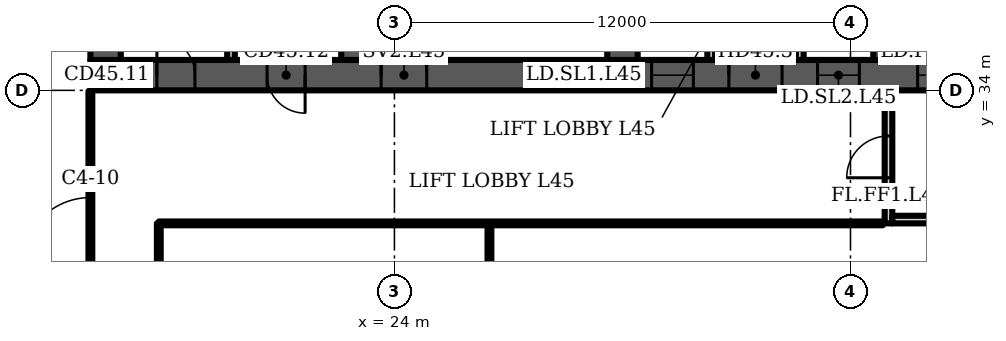
"""IFC4 building model, lengths in metres.
Left out: names, types, materials, properties, quantities, classifications, styles, units other than length and angle.
Written with IfcOpenShell. Run it as: python <this file> out.ifc"""

import sys

from ifc_helpers import new_model, si_unit, direction, frame, frame_2d, origin, place, context, subcontext, project, spatial, polyline, rectangle, outline, extrude, element, fill, save


model = new_model("IFC4")
c1 = context("Model", 3, precision=1e-05, world=origin(), true_north=direction((0.0, 1.0)))
c2 = subcontext(c1, "Body", "Model", "MODEL_VIEW")
j1 = project(units=[si_unit("LENGTHUNIT", "METRE"), si_unit("PLANEANGLEUNIT", "RADIAN")], contexts=[c1])
p1 = place(None, origin())
s1 = spatial("IfcSite", under=j1, at=p1, CompositionType="ELEMENT")
p2 = place(p1, origin())
s2 = spatial("IfcBuilding", under=s1, at=p2, CompositionType="ELEMENT")
p3 = place(p2, frame((0.0, 0.0, 184.3)))
s3 = spatial("IfcBuildingStorey", under=s2, at=p3, CompositionType="ELEMENT", Elevation=184.3)
p4 = place(p3, frame((16.0, 34.4, 0.0), z_axis=(0.0, 0.0, 1.0), x_axis=(1.0, 0.0, 0.0)))
e1 = element("IfcWall", 1, at=p4, inside=s3, PredefinedType="SHEAR", context=c2, shape_type="SweptSolid", body=[
    extrude(rectangle(XDim=42.0, YDim=0.8, at=frame_2d((21.0, 0.0))), origin(), (0.0, 0.0, 1.0), 3.6),
])
p5 = place(p4, frame((1.75, 0.0, 0.0)))
e2 = element("IfcOpeningElement", 2, at=p5, cuts=e1, PredefinedType="OPENING", context=c2, shape_type="SweptSolid", body=[
    extrude(rectangle(XDim=1.0, YDim=2.1, at=frame_2d((0.5, 1.05))), frame((0.0, 0.41, 0.0), z_axis=(0.0, -1.0, 0.0), x_axis=(1.0, 0.0, 0.0)), (0.0, 0.0, 1.0), 0.82),
])
p6 = place(p4, frame((4.65, 0.0, 0.0)))
e3 = element("IfcOpeningElement", 3, at=p6, cuts=e1, PredefinedType="OPENING", context=c2, shape_type="SweptSolid", body=[
    extrude(rectangle(XDim=1.0, YDim=2.1, at=frame_2d((0.5, 1.05))), frame((0.0, 0.41, 0.0), z_axis=(0.0, -1.0, 0.0), x_axis=(1.0, 0.0, 0.0)), (0.0, 0.0, 1.0), 0.82),
])
p7 = place(p4, frame((7.65, 0.0, 0.0)))
e4 = element("IfcOpeningElement", 4, at=p7, cuts=e1, PredefinedType="OPENING", context=c2, shape_type="SweptSolid", body=[
    extrude(rectangle(XDim=1.2, YDim=2.1, at=frame_2d((0.6, 1.05))), frame((0.0, 0.41, 0.0), z_axis=(0.0, -1.0, 0.0), x_axis=(1.0, 0.0, 0.0)), (0.0, 0.0, 1.0), 0.82),
])
p8 = place(p4, frame((14.767, 0.0, 0.0)))
e5 = element("IfcOpeningElement", 5, at=p8, cuts=e1, PredefinedType="OPENING", context=c2, shape_type="SweptSolid", body=[
    extrude(rectangle(XDim=1.1, YDim=2.1, at=frame_2d((0.55, 1.05))), frame((0.0, 0.41, 0.0), z_axis=(0.0, -1.0, 0.0), x_axis=(1.0, 0.0, 0.0)), (0.0, 0.0, 1.0), 0.82),
])
p9 = place(p4, frame((19.133, 0.0, 0.0)))
e6 = element("IfcOpeningElement", 6, at=p9, cuts=e1, PredefinedType="OPENING", context=c2, shape_type="SweptSolid", body=[
    extrude(rectangle(XDim=1.1, YDim=2.1, at=frame_2d((0.55, 1.05))), frame((0.0, 0.41, 0.0), z_axis=(0.0, -1.0, 0.0), x_axis=(1.0, 0.0, 0.0)), (0.0, 0.0, 1.0), 0.82),
])
p10 = place(p4, frame((16.8, 0.0, 0.0)))
e7 = element("IfcOpeningElement", 7, at=p10, cuts=e1, PredefinedType="OPENING", context=c2, shape_type="SweptSolid", body=[
    extrude(rectangle(XDim=1.4, YDim=2.1, at=frame_2d((0.7, 1.05))), frame((0.0, 0.41, 0.0), z_axis=(0.0, -1.0, 0.0), x_axis=(1.0, 0.0, 0.0)), (0.0, 0.0, 1.0), 0.82),
])
p11 = place(p4, frame((21.767, 0.0, 0.0)))
e8 = element("IfcOpeningElement", 8, at=p11, cuts=e1, PredefinedType="OPENING", context=c2, shape_type="SweptSolid", body=[
    extrude(rectangle(XDim=1.1, YDim=2.1, at=frame_2d((0.55, 1.05))), frame((0.0, 0.41, 0.0), z_axis=(0.0, -1.0, 0.0), x_axis=(1.0, 0.0, 0.0)), (0.0, 0.0, 1.0), 0.82),
])
p12 = place(p4, frame((23.95, 0.0, 0.0)))
e9 = element("IfcOpeningElement", 9, at=p12, cuts=e1, PredefinedType="OPENING", context=c2, shape_type="SweptSolid", body=[
    extrude(rectangle(XDim=1.1, YDim=2.1, at=frame_2d((0.55, 1.05))), frame((0.0, 0.41, 0.0), z_axis=(0.0, -1.0, 0.0), x_axis=(1.0, 0.0, 0.0)), (0.0, 0.0, 1.0), 0.82),
])
p13 = place(p4, frame((26.133, 0.0, 0.0)))
e10 = element("IfcOpeningElement", 10, at=p13, cuts=e1, PredefinedType="OPENING", context=c2, shape_type="SweptSolid", body=[
    extrude(rectangle(XDim=1.1, YDim=2.1, at=frame_2d((0.55, 1.05))), frame((0.0, 0.41, 0.0), z_axis=(0.0, -1.0, 0.0), x_axis=(1.0, 0.0, 0.0)), (0.0, 0.0, 1.0), 0.82),
])
p14 = place(p4, frame((33.15, 0.0, 0.0)))
e11 = element("IfcOpeningElement", 11, at=p14, cuts=e1, PredefinedType="OPENING", context=c2, shape_type="SweptSolid", body=[
    extrude(rectangle(XDim=1.2, YDim=2.1, at=frame_2d((0.6, 1.05))), frame((0.0, 0.41, 0.0), z_axis=(0.0, -1.0, 0.0), x_axis=(1.0, 0.0, 0.0)), (0.0, 0.0, 1.0), 0.82),
])
p15 = place(p4, frame((35.817, 0.0, 0.0)))
e12 = element("IfcOpeningElement", 12, at=p15, cuts=e1, PredefinedType="OPENING", context=c2, shape_type="SweptSolid", body=[
    extrude(rectangle(XDim=1.0, YDim=2.1, at=frame_2d((0.5, 1.05))), frame((0.0, 0.41, 0.0), z_axis=(0.0, -1.0, 0.0), x_axis=(1.0, 0.0, 0.0)), (0.0, 0.0, 1.0), 0.82),
])
p16 = place(p4, frame((39.95, 0.0, 0.0)))
e13 = element("IfcOpeningElement", 13, at=p16, cuts=e1, PredefinedType="OPENING", context=c2, shape_type="SweptSolid", body=[
    extrude(rectangle(XDim=1.0, YDim=2.1, at=frame_2d((0.5, 1.05))), frame((0.0, 0.41, 0.0), z_axis=(0.0, -1.0, 0.0), x_axis=(1.0, 0.0, 0.0)), (0.0, 0.0, 1.0), 0.82),
])
p17 = place(p4, frame((37.767, 0.0, 0.0)))
e14 = element("IfcOpeningElement", 14, at=p17, cuts=e1, PredefinedType="OPENING", context=c2, shape_type="SweptSolid", body=[
    extrude(rectangle(XDim=1.4, YDim=2.1, at=frame_2d((0.7, 1.05))), frame((0.0, 0.41, 0.0), z_axis=(0.0, -1.0, 0.0), x_axis=(1.0, 0.0, 0.0)), (0.0, 0.0, 1.0), 0.82),
])
p18 = place(p3, frame((16.4, 34.8, 0.0), z_axis=(0.0, 0.0, 1.0), x_axis=(0.0, 1.0, 0.0)))
e15 = element("IfcWall", 15, at=p18, inside=s3, PredefinedType="SHEAR", context=c2, shape_type="SweptSolid", body=[
    extrude(rectangle(XDim=13.184, YDim=0.8, at=frame_2d((6.592, 0.0))), origin(), (0.0, 0.0, 1.0), 3.6),
])
p19 = place(p3, frame((23.0, 34.8, 0.0), z_axis=(0.0, 0.0, 1.0), x_axis=(0.0, 1.0, 0.0)))
e16 = element("IfcWall", 16, at=p19, inside=s3, PredefinedType="SHEAR", context=c2, shape_type="SweptSolid", body=[
    extrude(rectangle(XDim=13.762, YDim=0.8, at=frame_2d((6.881, 0.0))), origin(), (0.0, 0.0, 1.0), 3.6),
])
p20 = place(p19, frame((10.0, 0.0, 0.0)))
e17 = element("IfcOpeningElement", 17, at=p20, cuts=e16, PredefinedType="OPENING", context=c2, shape_type="SweptSolid", body=[
    extrude(rectangle(XDim=1.0, YDim=2.1, at=frame_2d((0.5, 1.05))), frame((0.0, 0.41, 0.0), z_axis=(0.0, -1.0, 0.0), x_axis=(1.0, 0.0, 0.0)), (0.0, 0.0, 1.0), 0.82),
])
p21 = place(p3, frame((30.0, 34.8, 0.0), z_axis=(0.0, 0.0, 1.0), x_axis=(0.0, 1.0, 0.0)))
e18 = element("IfcWall", 18, at=p21, inside=s3, PredefinedType="SHEAR", context=c2, shape_type="SweptSolid", body=[
    extrude(rectangle(XDim=14.374, YDim=0.8, at=frame_2d((7.187, 0.0))), origin(), (0.0, 0.0, 1.0), 3.6),
])
p22 = place(p21, frame((3.6, 0.0, 0.0)))
e19 = element("IfcOpeningElement", 19, at=p22, cuts=e18, PredefinedType="OPENING", context=c2, shape_type="SweptSolid", body=[
    extrude(rectangle(XDim=1.1, YDim=2.1, at=frame_2d((0.55, 1.05))), frame((0.0, 0.41, 0.0), z_axis=(0.0, -1.0, 0.0), x_axis=(1.0, 0.0, 0.0)), (0.0, 0.0, 1.0), 0.82),
])
p23 = place(p3, frame((37.0, 34.8, 0.0), z_axis=(0.0, 0.0, 1.0), x_axis=(0.0, 1.0, 0.0)))
e20 = element("IfcWall", 20, at=p23, inside=s3, PredefinedType="SHEAR", context=c2, shape_type="SweptSolid", body=[
    extrude(rectangle(XDim=14.987, YDim=0.8, at=frame_2d((7.493, 0.0))), origin(), (0.0, 0.0, 1.0), 3.6),
])
p24 = place(p23, frame((11.312, 0.0, 0.0)))
e21 = element("IfcOpeningElement", 21, at=p24, cuts=e20, PredefinedType="OPENING", context=c2, shape_type="SweptSolid", body=[
    extrude(rectangle(XDim=1.0, YDim=2.1, at=frame_2d((0.5, 1.05))), frame((0.0, 0.41, 0.0), z_axis=(0.0, -1.0, 0.0), x_axis=(1.0, 0.0, 0.0)), (0.0, 0.0, 1.0), 0.82),
])
p25 = place(p23, frame((3.6, 0.0, 0.0)))
e22 = element("IfcOpeningElement", 22, at=p25, cuts=e20, PredefinedType="OPENING", context=c2, shape_type="SweptSolid", body=[
    extrude(rectangle(XDim=1.1, YDim=2.1, at=frame_2d((0.55, 1.05))), frame((0.0, 0.41, 0.0), z_axis=(0.0, -1.0, 0.0), x_axis=(1.0, 0.0, 0.0)), (0.0, 0.0, 1.0), 0.82),
])
p26 = place(p3, frame((19.7, 34.8, 0.0), z_axis=(0.0, 0.0, 1.0), x_axis=(0.0, 1.0, 0.0)))
e23 = element("IfcWall", 23, at=p26, inside=s3, PredefinedType="PARTITIONING", context=c2, shape_type="SweptSolid", body=[
    extrude(rectangle(XDim=13.234, YDim=0.2, at=frame_2d((6.617, 0.0))), origin(), (0.0, 0.0, 1.0), 3.2),
])
p27 = place(p3, frame((0.0, 0.0, -0.0)))
e24 = element("IfcWall", 24, at=p27, inside=s3, PredefinedType="PARTITIONING", context=c2, shape_type="SweptSolid", body=[
    extrude(outline(polyline([(32.233, 37.65), (30.4, 37.65), (30.4, 37.85), (32.233, 37.85), (32.433, 37.85), (32.433, 34.8), (32.233, 34.8), (32.233, 37.65)])), origin(), (0.0, 0.0, 1.0), 3.2),
])
p28 = place(p3, frame((0.0, 0.0, -0.0)))
e25 = element("IfcWall", 25, at=p28, inside=s3, PredefinedType="PARTITIONING", context=c2, shape_type="SweptSolid", body=[
    extrude(outline(polyline([(34.567, 37.85), (34.767, 37.85), (36.6, 37.85), (36.6, 37.65), (34.767, 37.65), (34.767, 34.8), (34.567, 34.8), (34.567, 37.85)])), origin(), (0.0, 0.0, 1.0), 3.2),
])
p29 = place(p3, frame((0.0, 0.0, -0.0)))
e26 = element("IfcWall", 26, at=p29, inside=s3, PredefinedType="PARTITIONING", context=c2, shape_type="SweptSolid", body=[
    extrude(outline(polyline([(41.567, 37.1), (39.433, 37.1), (39.433, 34.8), (39.233, 34.8), (39.233, 37.65), (37.4, 37.65), (37.4, 37.85), (39.233, 37.85), (39.433, 37.85), (39.433, 37.3), (41.567, 37.3), (41.567, 37.55), (41.767, 37.55), (43.6, 37.55), (43.6, 37.35), (41.767, 37.35), (41.767, 34.8), (41.567, 34.8), (41.567, 37.1)])), origin(), (0.0, 0.0, 1.0), 3.2),
])
p30 = place(p3, frame((37.0, 30.5, 0.0), z_axis=(0.0, 0.0, 1.0), x_axis=(0.0, 1.0, 0.0)))
e27 = element("IfcWall", 27, at=p30, inside=s3, PredefinedType="PARTITIONING", context=c2, shape_type="SweptSolid", body=[
    extrude(rectangle(XDim=3.5, YDim=0.2, at=frame_2d((1.75, 0.0))), origin(), (0.0, 0.0, 1.0), 3.2),
])
p31 = place(p30, frame((1.2, 0.0, 0.0)))
e28 = element("IfcOpeningElement", 28, at=p31, cuts=e27, PredefinedType="OPENING", context=c2, shape_type="SweptSolid", body=[
    extrude(rectangle(XDim=1.1, YDim=2.1, at=frame_2d((0.55, 1.05))), frame((0.0, 0.11, 0.0), z_axis=(0.0, -1.0, 0.0), x_axis=(1.0, 0.0, 0.0)), (0.0, 0.0, 1.0), 0.22),
])
p32 = place(p3, frame((37.1, 30.6, 0.0), z_axis=(0.0, 0.0, 1.0), x_axis=(1.0, 0.0, 0.0)))
e29 = element("IfcWall", 29, at=p32, inside=s3, PredefinedType="PARTITIONING", context=c2, shape_type="SweptSolid", body=[
    extrude(rectangle(XDim=2.8, YDim=0.2, at=frame_2d((1.4, 0.0))), origin(), (0.0, 0.0, 1.0), 3.2),
])
p33 = place(p3, frame((16.0, 26.42, 0.0), z_axis=(0.0, 0.0, 1.0), x_axis=(0.0, 1.0, 0.0)))
e30 = element("IfcWall", 30, at=p33, inside=s3, PredefinedType="PARTITIONING", context=c2, shape_type="SweptSolid", body=[
    extrude(rectangle(XDim=7.56, YDim=0.1, at=frame_2d((3.78, 0.0))), origin(), (0.0, 0.0, 1.0), 3.2),
])
p34 = place(p33, frame((2.96, 0.0, 0.0)))
e31 = element("IfcOpeningElement", 31, at=p34, cuts=e30, PredefinedType="OPENING", context=c2, shape_type="SweptSolid", body=[
    extrude(rectangle(XDim=1.8, YDim=2.1, at=frame_2d((0.9, 1.05))), frame((0.0, 0.06, 0.0), z_axis=(0.0, -1.0, 0.0), x_axis=(1.0, 0.0, 0.0)), (0.0, 0.0, 1.0), 0.12),
])
p35 = place(p3, frame((17.8, 25.485, 0.0), z_axis=(0.0, 0.0, 1.0), x_axis=(0.0, 1.0, 0.0)))
e32 = element("IfcWall", 32, at=p35, inside=s3, PredefinedType="PARTITIONING", context=c2, shape_type="SweptSolid", body=[
    extrude(rectangle(XDim=5.015, YDim=0.1, at=frame_2d((2.507, 0.0))), origin(), (0.0, 0.0, 1.0), 3.2),
])
p36 = place(p3, frame((17.8, 30.5, 0.0), z_axis=(0.0, 0.0, 1.0), x_axis=(1.0, 0.0, 0.0)))
e33 = element("IfcWall", 33, at=p36, inside=s3, PredefinedType="PARTITIONING", context=c2, shape_type="SweptSolid", body=[
    extrude(rectangle(XDim=19.05, YDim=0.1, at=frame_2d((9.525, 0.0))), origin(), (0.0, 0.0, 1.0), 3.2),
])
p37 = place(p3, frame((26.5, 13.535, 0.0), z_axis=(0.0, 0.0, 1.0), x_axis=(0.0, 1.0, 0.0)))
e34 = element("IfcWall", 34, at=p37, inside=s3, PredefinedType="PARTITIONING", context=c2, shape_type="SweptSolid", body=[
    extrude(rectangle(XDim=16.965, YDim=0.1, at=frame_2d((8.482, 0.0))), origin(), (0.0, 0.0, 1.0), 3.2),
])
p38 = place(p5, origin())
e35 = element("IfcDoor", 35, at=p38, inside=s3, OperationType="SINGLE_SWING_LEFT", PredefinedType="DOOR", context=c2, shape_type="SweptSolid", body=[
    extrude(rectangle(XDim=1.0, YDim=2.1, at=frame_2d((0.5, 1.05))), frame((0.0, 0.4, 0.0), z_axis=(0.0, -1.0, 0.0), x_axis=(1.0, 0.0, 0.0)), (0.0, 0.0, 1.0), 0.8),
])
fill(e2, e35)
p39 = place(p6, origin())
e36 = element("IfcDoor", 36, at=p39, inside=s3, OperationType="SINGLE_SWING_RIGHT", PredefinedType="DOOR", context=c2, shape_type="SweptSolid", body=[
    extrude(rectangle(XDim=1.0, YDim=2.1, at=frame_2d((0.5, 1.05))), frame((0.0, 0.4, 0.0), z_axis=(0.0, -1.0, 0.0), x_axis=(1.0, 0.0, 0.0)), (0.0, 0.0, 1.0), 0.8),
])
fill(e3, e36)
p40 = place(p7, origin())
e37 = element("IfcDoor", 37, at=p40, inside=s3, OperationType="SINGLE_SWING_LEFT", PredefinedType="DOOR", context=c2, shape_type="SweptSolid", body=[
    extrude(rectangle(XDim=1.2, YDim=2.1, at=frame_2d((0.6, 1.05))), frame((0.0, 0.025, 0.0), z_axis=(0.0, -1.0, 0.0), x_axis=(1.0, 0.0, 0.0)), (0.0, 0.0, 1.0), 0.05),
])
fill(e4, e37)
p41 = place(p8, origin())
e38 = element("IfcDoor", 38, at=p41, inside=s3, OperationType="DOUBLE_DOOR_SLIDING", PredefinedType="DOOR", context=c2, shape_type="SweptSolid", body=[
    extrude(rectangle(XDim=1.1, YDim=2.1, at=frame_2d((0.55, 1.05))), frame((0.0, 0.025, 0.0), z_axis=(0.0, -1.0, 0.0), x_axis=(1.0, 0.0, 0.0)), (0.0, 0.0, 1.0), 0.05),
])
fill(e5, e38)
p42 = place(p9, origin())
e39 = element("IfcDoor", 39, at=p42, inside=s3, OperationType="DOUBLE_DOOR_SLIDING", PredefinedType="DOOR", context=c2, shape_type="SweptSolid", body=[
    extrude(rectangle(XDim=1.1, YDim=2.1, at=frame_2d((0.55, 1.05))), frame((0.0, 0.025, 0.0), z_axis=(0.0, -1.0, 0.0), x_axis=(1.0, 0.0, 0.0)), (0.0, 0.0, 1.0), 0.05),
])
fill(e6, e39)
p43 = place(p10, origin())
e40 = element("IfcDoor", 40, at=p43, inside=s3, OperationType="DOUBLE_DOOR_SINGLE_SWING", PredefinedType="DOOR", context=c2, shape_type="SweptSolid", body=[
    extrude(rectangle(XDim=1.4, YDim=2.1, at=frame_2d((0.7, 1.05))), frame((0.0, 0.025, 0.0), z_axis=(0.0, -1.0, 0.0), x_axis=(1.0, 0.0, 0.0)), (0.0, 0.0, 1.0), 0.05),
])
fill(e7, e40)
p44 = place(p11, origin())
e41 = element("IfcDoor", 41, at=p44, inside=s3, OperationType="DOUBLE_DOOR_SLIDING", PredefinedType="DOOR", context=c2, shape_type="SweptSolid", body=[
    extrude(rectangle(XDim=1.1, YDim=2.1, at=frame_2d((0.55, 1.05))), frame((0.0, 0.025, 0.0), z_axis=(0.0, -1.0, 0.0), x_axis=(1.0, 0.0, 0.0)), (0.0, 0.0, 1.0), 0.05),
])
fill(e8, e41)
p45 = place(p31, origin())
e42 = element("IfcDoor", 42, at=p45, inside=s3, OperationType="SINGLE_SWING_LEFT", PredefinedType="DOOR", context=c2, shape_type="SweptSolid", body=[
    extrude(rectangle(XDim=1.1, YDim=2.1, at=frame_2d((0.55, 1.05))), frame((0.0, 0.025, 0.0), z_axis=(0.0, -1.0, 0.0), x_axis=(1.0, 0.0, 0.0)), (0.0, 0.0, 1.0), 0.05),
])
fill(e28, e42)
p46 = place(p34, origin())
e43 = element("IfcDoor", 43, at=p46, inside=s3, OperationType="DOUBLE_DOOR_SINGLE_SWING", PredefinedType="DOOR", context=c2, shape_type="SweptSolid", body=[
    extrude(rectangle(XDim=1.8, YDim=2.1, at=frame_2d((0.9, 1.05))), frame((0.0, 0.025, 0.0), z_axis=(0.0, -1.0, 0.0), x_axis=(1.0, 0.0, 0.0)), (0.0, 0.0, 1.0), 0.05),
])
fill(e31, e43)
save(model, sys.argv[1])
